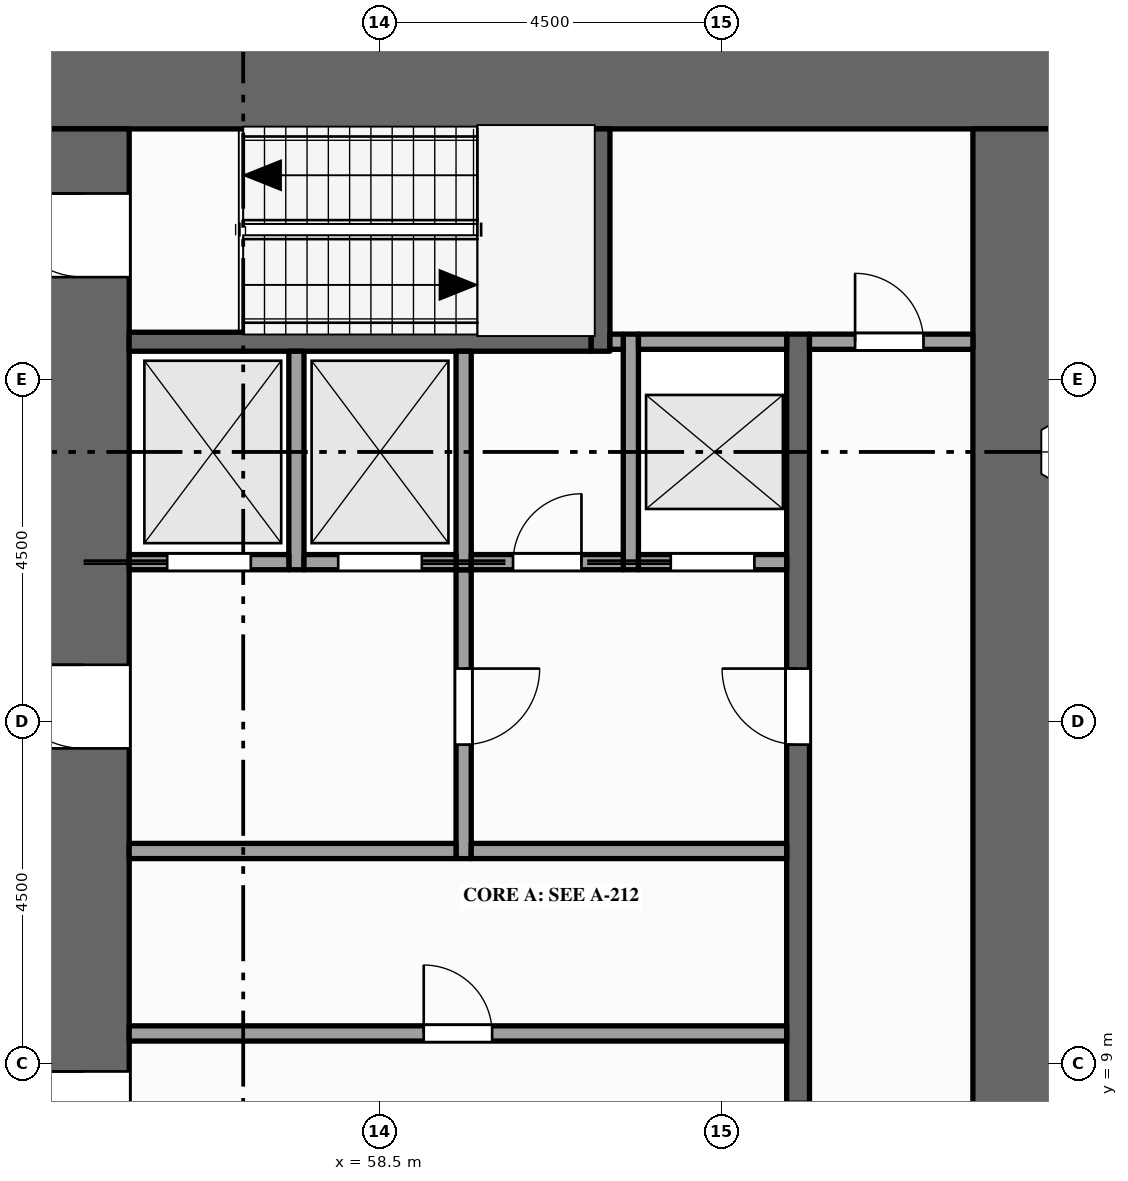
"""IFC4 building model, lengths in metres.
Left out: names, types, materials, properties, quantities, classifications, styles, units other than length and angle.
Written with IfcOpenShell. Run it as: python <this file> out.ifc"""

import sys

from ifc_helpers import new_model, si_unit, direction, frame, frame_2d, origin, place, context, subcontext, project, spatial, rectangle, extrude, element, fill, save


model = new_model("IFC4")
c1 = context("Model", 3, precision=1e-05, world=origin(), true_north=direction((0.0, 1.0)))
c2 = subcontext(c1, "Body", "Model", "MODEL_VIEW")
j1 = project(units=[si_unit("LENGTHUNIT", "METRE"), si_unit("PLANEANGLEUNIT", "RADIAN")], contexts=[c1])
p1 = place(None, origin())
s1 = spatial("IfcSite", under=j1, at=p1, CompositionType="ELEMENT")
p2 = place(p1, origin())
s2 = spatial("IfcBuilding", under=s1, at=p2, CompositionType="ELEMENT")
p3 = place(p2, frame((0.0, 0.0, 61.0)))
s3 = spatial("IfcBuildingStorey", under=s2, at=p3, CompositionType="ELEMENT", Elevation=61.0)
p4 = place(p3, frame((54.0, 21.9, -0.15), z_axis=(0.0, 0.0, 1.0), x_axis=(1.0, 0.0, 0.0)))
e1 = element("IfcWall", 1, at=p4, inside=s3, PredefinedType="SHEAR", context=c2, shape_type="SweptSolid", body=[
    extrude(rectangle(XDim=13.5, YDim=1.2, at=frame_2d((6.75, 0.0))), origin(), (0.0, 0.0, 1.0), 4.0),
])
p5 = place(p3, frame((54.6, 1.2, -0.15), z_axis=(0.0, 0.0, 1.0), x_axis=(0.0, 1.0, 0.0)))
e2 = element("IfcWall", 2, at=p5, inside=s3, PredefinedType="SHEAR", context=c2, shape_type="SweptSolid", body=[
    extrude(rectangle(XDim=20.1, YDim=1.2, at=frame_2d((10.05, 0.0))), origin(), (0.0, 0.0, 1.0), 4.0),
])
p6 = place(p5, frame((5.9, 0.0, 0.15)))
e3 = element("IfcOpeningElement", 3, at=p6, cuts=e2, PredefinedType="OPENING", context=c2, shape_type="SweptSolid", body=[
    extrude(rectangle(XDim=1.8, YDim=2.1, at=frame_2d((0.9, 1.05))), frame((0.0, 0.61, 0.0), z_axis=(0.0, -1.0, 0.0), x_axis=(1.0, 0.0, 0.0)), (0.0, 0.0, 1.0), 1.22),
])
p7 = place(p5, frame((11.95, 0.0, 0.15)))
e4 = element("IfcOpeningElement", 4, at=p7, cuts=e2, PredefinedType="OPENING", context=c2, shape_type="SweptSolid", body=[
    extrude(rectangle(XDim=1.1, YDim=2.1, at=frame_2d((0.55, 1.05))), frame((0.0, 0.61, 0.0), z_axis=(0.0, -1.0, 0.0), x_axis=(1.0, 0.0, 0.0)), (0.0, 0.0, 1.0), 1.22),
])
p8 = place(p5, frame((0.95, 0.0, 0.15)))
e5 = element("IfcOpeningElement", 5, at=p8, cuts=e2, PredefinedType="OPENING", context=c2, shape_type="SweptSolid", body=[
    extrude(rectangle(XDim=1.1, YDim=2.1, at=frame_2d((0.55, 1.05))), frame((0.0, 0.61, 0.0), z_axis=(0.0, -1.0, 0.0), x_axis=(1.0, 0.0, 0.0)), (0.0, 0.0, 1.0), 1.22),
])
p9 = place(p5, frame((18.15, 0.0, 0.15)))
e6 = element("IfcOpeningElement", 6, at=p9, cuts=e2, PredefinedType="OPENING", context=c2, shape_type="SweptSolid", body=[
    extrude(rectangle(XDim=1.1, YDim=2.1, at=frame_2d((0.55, 1.05))), frame((0.0, 0.61, 0.0), z_axis=(0.0, -1.0, 0.0), x_axis=(1.0, 0.0, 0.0)), (0.0, 0.0, 1.0), 1.22),
])
p10 = place(p3, frame((66.9, 1.2, -0.15), z_axis=(0.0, 0.0, 1.0), x_axis=(0.0, 1.0, 0.0)))
e7 = element("IfcWall", 7, at=p10, inside=s3, PredefinedType="SHEAR", context=c2, shape_type="SweptSolid", body=[
    extrude(rectangle(XDim=20.1, YDim=1.2, at=frame_2d((10.05, 0.0))), origin(), (0.0, 0.0, 1.0), 4.0),
])
p11 = place(p3, frame((57.4, 15.5, 0.0), z_axis=(0.0, 0.0, 1.0), x_axis=(0.0, 1.0, 0.0)))
e8 = element("IfcWall", 8, at=p11, inside=s3, PredefinedType="SOLIDWALL", context=c2, shape_type="SweptSolid", body=[
    extrude(rectangle(XDim=2.875, YDim=0.2, at=frame_2d((1.438, 0.0))), origin(), (0.0, 0.0, 1.0), 3.85),
])
p12 = place(p3, frame((59.6, 11.7, 0.0), z_axis=(0.0, 0.0, 1.0), x_axis=(0.0, 1.0, 0.0)))
e9 = element("IfcWall", 9, at=p12, inside=s3, PredefinedType="PARTITIONING", context=c2, shape_type="SweptSolid", body=[
    extrude(rectangle(XDim=3.8, YDim=0.2, at=frame_2d((1.9, 0.0))), origin(), (0.0, 0.0, 1.0), 3.85),
])
p13 = place(p12, frame((1.5, 0.0, 0.0)))
e10 = element("IfcOpeningElement", 10, at=p13, cuts=e9, PredefinedType="OPENING", context=c2, shape_type="SweptSolid", body=[
    extrude(rectangle(XDim=1.0, YDim=2.1, at=frame_2d((0.5, 1.05))), frame((0.0, 0.11, 0.0), z_axis=(0.0, -1.0, 0.0), x_axis=(1.0, 0.0, 0.0)), (0.0, 0.0, 1.0), 0.22),
])
p14 = place(p3, frame((59.6, 15.5, 0.0), z_axis=(0.0, 0.0, 1.0), x_axis=(0.0, 1.0, 0.0)))
e11 = element("IfcWall", 11, at=p14, inside=s3, PredefinedType="SOLIDWALL", context=c2, shape_type="SweptSolid", body=[
    extrude(rectangle(XDim=2.875, YDim=0.2, at=frame_2d((1.438, 0.0))), origin(), (0.0, 0.0, 1.0), 3.85),
])
p15 = place(p3, frame((61.4, 18.375, 0.0), z_axis=(0.0, 0.0, 1.0), x_axis=(0.0, 1.0, 0.0)))
e12 = element("IfcWall", 12, at=p15, inside=s3, PredefinedType="SHEAR", context=c2, shape_type="SweptSolid", body=[
    extrude(rectangle(XDim=2.925, YDim=0.25, at=frame_2d((1.462, 0.0))), origin(), (0.0, 0.0, 1.0), 3.85),
])
p16 = place(p3, frame((61.8, 15.5, 0.0), z_axis=(0.0, 0.0, 1.0), x_axis=(0.0, 1.0, 0.0)))
e13 = element("IfcWall", 13, at=p16, inside=s3, PredefinedType="SOLIDWALL", context=c2, shape_type="SweptSolid", body=[
    extrude(rectangle(XDim=3.1, YDim=0.2, at=frame_2d((1.55, 0.0))), origin(), (0.0, 0.0, 1.0), 3.85),
])
p17 = place(p3, frame((64.0, 4.1, 0.0), z_axis=(0.0, 0.0, 1.0), x_axis=(0.0, 1.0, 0.0)))
e14 = element("IfcWall", 14, at=p17, inside=s3, PredefinedType="SHEAR", context=c2, shape_type="SweptSolid", body=[
    extrude(rectangle(XDim=14.5, YDim=0.3, at=frame_2d((7.25, 0.0))), origin(), (0.0, 0.0, 1.0), 3.85),
])
p18 = place(p17, frame((3.4, 0.0, 0.0)))
e15 = element("IfcOpeningElement", 15, at=p18, cuts=e14, PredefinedType="OPENING", context=c2, shape_type="SweptSolid", body=[
    extrude(rectangle(XDim=1.0, YDim=2.1, at=frame_2d((0.5, 1.05))), frame((0.0, 0.16, 0.0), z_axis=(0.0, -1.0, 0.0), x_axis=(1.0, 0.0, 0.0)), (0.0, 0.0, 1.0), 0.32),
])
p19 = place(p17, frame((9.1, 0.0, 0.0)))
e16 = element("IfcOpeningElement", 16, at=p19, cuts=e14, PredefinedType="OPENING", context=c2, shape_type="SweptSolid", body=[
    extrude(rectangle(XDim=1.0, YDim=2.1, at=frame_2d((0.5, 1.05))), frame((0.0, 0.16, 0.0), z_axis=(0.0, -1.0, 0.0), x_axis=(1.0, 0.0, 0.0)), (0.0, 0.0, 1.0), 0.32),
])
p20 = place(p3, frame((55.2, 9.4, 0.0), z_axis=(0.0, 0.0, 1.0), x_axis=(1.0, 0.0, 0.0)))
e17 = element("IfcWall", 17, at=p20, inside=s3, PredefinedType="PARTITIONING", context=c2, shape_type="SweptSolid", body=[
    extrude(rectangle(XDim=8.65, YDim=0.2, at=frame_2d((4.325, 0.0))), origin(), (0.0, 0.0, 1.0), 3.85),
])
p21 = place(p20, frame((3.875, 0.0, 0.0)))
e18 = element("IfcOpeningElement", 18, at=p21, cuts=e17, PredefinedType="OPENING", context=c2, shape_type="SweptSolid", body=[
    extrude(rectangle(XDim=0.9, YDim=2.1, at=frame_2d((0.45, 1.05))), frame((0.0, 0.11, 0.0), z_axis=(0.0, -1.0, 0.0), x_axis=(1.0, 0.0, 0.0)), (0.0, 0.0, 1.0), 0.22),
])
p22 = place(p3, frame((55.2, 11.8, 0.0), z_axis=(0.0, 0.0, 1.0), x_axis=(1.0, 0.0, 0.0)))
e19 = element("IfcWall", 19, at=p22, inside=s3, PredefinedType="PARTITIONING", context=c2, shape_type="SweptSolid", body=[
    extrude(rectangle(XDim=4.3, YDim=0.2, at=frame_2d((2.15, 0.0))), origin(), (0.0, 0.0, 1.0), 3.85),
])
p23 = place(p3, frame((59.7, 11.8, 0.0), z_axis=(0.0, 0.0, 1.0), x_axis=(1.0, 0.0, 0.0)))
e20 = element("IfcWall", 20, at=p23, inside=s3, PredefinedType="PARTITIONING", context=c2, shape_type="SweptSolid", body=[
    extrude(rectangle(XDim=4.15, YDim=0.2, at=frame_2d((2.075, 0.0))), origin(), (0.0, 0.0, 1.0), 3.85),
])
p24 = place(p3, frame((55.2, 15.6, 0.0), z_axis=(0.0, 0.0, 1.0), x_axis=(1.0, 0.0, 0.0)))
e21 = element("IfcWall", 21, at=p24, inside=s3, PredefinedType="SOLIDWALL", context=c2, shape_type="SweptSolid", body=[
    extrude(rectangle(XDim=2.1, YDim=0.2, at=frame_2d((1.05, 0.0))), origin(), (0.0, 0.0, 1.0), 3.85),
])
p25 = place(p24, frame((0.5, 0.0, 0.012)))
e22 = element("IfcOpeningElement", 22, at=p25, cuts=e21, PredefinedType="OPENING", context=c2, shape_type="SweptSolid", body=[
    extrude(rectangle(XDim=1.1, YDim=2.1, at=frame_2d((0.55, 1.05))), frame((0.0, 0.11, 0.0), z_axis=(0.0, -1.0, 0.0), x_axis=(1.0, 0.0, 0.0)), (0.0, 0.0, 1.0), 0.22),
])
p26 = place(p3, frame((57.5, 15.6, 0.0), z_axis=(0.0, 0.0, 1.0), x_axis=(1.0, 0.0, 0.0)))
e23 = element("IfcWall", 23, at=p26, inside=s3, PredefinedType="SOLIDWALL", context=c2, shape_type="SweptSolid", body=[
    extrude(rectangle(XDim=2.0, YDim=0.2, at=frame_2d((1.0, 0.0))), origin(), (0.0, 0.0, 1.0), 3.85),
])
p27 = place(p26, frame((0.45, 0.0, 0.012)))
e24 = element("IfcOpeningElement", 24, at=p27, cuts=e23, PredefinedType="OPENING", context=c2, shape_type="SweptSolid", body=[
    extrude(rectangle(XDim=1.1, YDim=2.1, at=frame_2d((0.55, 1.05))), frame((0.0, 0.11, 0.0), z_axis=(0.0, -1.0, 0.0), x_axis=(1.0, 0.0, 0.0)), (0.0, 0.0, 1.0), 0.22),
])
p28 = place(p3, frame((59.7, 15.6, 0.0), z_axis=(0.0, 0.0, 1.0), x_axis=(1.0, 0.0, 0.0)))
e25 = element("IfcWall", 25, at=p28, inside=s3, PredefinedType="PARTITIONING", context=c2, shape_type="SweptSolid", body=[
    extrude(rectangle(XDim=2.0, YDim=0.2, at=frame_2d((1.0, 0.0))), origin(), (0.0, 0.0, 1.0), 3.85),
])
p29 = place(p28, frame((0.55, 0.0, 0.0)))
e26 = element("IfcOpeningElement", 26, at=p29, cuts=e25, PredefinedType="OPENING", context=c2, shape_type="SweptSolid", body=[
    extrude(rectangle(XDim=0.9, YDim=2.1, at=frame_2d((0.45, 1.05))), frame((0.0, 0.11, 0.0), z_axis=(0.0, -1.0, 0.0), x_axis=(1.0, 0.0, 0.0)), (0.0, 0.0, 1.0), 0.22),
])
p30 = place(p3, frame((61.9, 15.6, 0.0), z_axis=(0.0, 0.0, 1.0), x_axis=(1.0, 0.0, 0.0)))
e27 = element("IfcWall", 27, at=p30, inside=s3, PredefinedType="SOLIDWALL", context=c2, shape_type="SweptSolid", body=[
    extrude(rectangle(XDim=1.95, YDim=0.2, at=frame_2d((0.975, 0.0))), origin(), (0.0, 0.0, 1.0), 3.85),
])
p31 = place(p30, frame((0.425, 0.0, 0.012)))
e28 = element("IfcOpeningElement", 28, at=p31, cuts=e27, PredefinedType="OPENING", context=c2, shape_type="SweptSolid", body=[
    extrude(rectangle(XDim=1.1, YDim=2.1, at=frame_2d((0.55, 1.05))), frame((0.0, 0.11, 0.0), z_axis=(0.0, -1.0, 0.0), x_axis=(1.0, 0.0, 0.0)), (0.0, 0.0, 1.0), 0.22),
])
p32 = place(p3, frame((55.2, 18.5, 0.0), z_axis=(0.0, 0.0, 1.0), x_axis=(1.0, 0.0, 0.0)))
e29 = element("IfcWall", 29, at=p32, inside=s3, PredefinedType="SHEAR", context=c2, shape_type="SweptSolid", body=[
    extrude(rectangle(XDim=6.075, YDim=0.25, at=frame_2d((3.038, 0.0))), origin(), (0.0, 0.0, 1.0), 3.85),
])
p33 = place(p3, frame((61.525, 18.5, 0.0), z_axis=(0.0, 0.0, 1.0), x_axis=(1.0, 0.0, 0.0)))
e30 = element("IfcWall", 30, at=p33, inside=s3, PredefinedType="PARTITIONING", context=c2, shape_type="SweptSolid", body=[
    extrude(rectangle(XDim=0.175, YDim=0.2, at=frame_2d((0.087, 0.0))), origin(), (0.0, 0.0, 1.0), 3.85),
])
p34 = place(p3, frame((61.9, 18.5, 0.0), z_axis=(0.0, 0.0, 1.0), x_axis=(1.0, 0.0, 0.0)))
e31 = element("IfcWall", 31, at=p34, inside=s3, PredefinedType="SOLIDWALL", context=c2, shape_type="SweptSolid", body=[
    extrude(rectangle(XDim=1.95, YDim=0.2, at=frame_2d((0.975, 0.0))), origin(), (0.0, 0.0, 1.0), 3.85),
])
p35 = place(p3, frame((64.15, 18.5, 0.0), z_axis=(0.0, 0.0, 1.0), x_axis=(1.0, 0.0, 0.0)))
e32 = element("IfcWall", 32, at=p35, inside=s3, PredefinedType="PARTITIONING", context=c2, shape_type="SweptSolid", body=[
    extrude(rectangle(XDim=2.15, YDim=0.2, at=frame_2d((1.075, 0.0))), origin(), (0.0, 0.0, 1.0), 3.85),
])
p36 = place(p35, frame((0.6, 0.0, 0.0)))
e33 = element("IfcOpeningElement", 33, at=p36, cuts=e32, PredefinedType="OPENING", context=c2, shape_type="SweptSolid", body=[
    extrude(rectangle(XDim=0.9, YDim=2.1, at=frame_2d((0.45, 1.05))), frame((0.0, 0.11, 0.0), z_axis=(0.0, -1.0, 0.0), x_axis=(1.0, 0.0, 0.0)), (0.0, 0.0, 1.0), 0.22),
])
p37 = place(p25, origin())
e34 = element("IfcDoor", 34, at=p37, inside=s3, OperationType="SLIDING_TO_LEFT", PredefinedType="DOOR", context=c2, shape_type="SweptSolid", body=[
    extrude(rectangle(XDim=1.1, YDim=2.1, at=frame_2d((0.55, 1.05))), frame((0.0, 0.025, 0.0), z_axis=(0.0, -1.0, 0.0), x_axis=(1.0, 0.0, 0.0)), (0.0, 0.0, 1.0), 0.05),
])
fill(e22, e34)
p38 = place(p27, origin())
e35 = element("IfcDoor", 35, at=p38, inside=s3, OperationType="SLIDING_TO_RIGHT", PredefinedType="DOOR", context=c2, shape_type="SweptSolid", body=[
    extrude(rectangle(XDim=1.1, YDim=2.1, at=frame_2d((0.55, 1.05))), frame((0.0, 0.025, 0.0), z_axis=(0.0, -1.0, 0.0), x_axis=(1.0, 0.0, 0.0)), (0.0, 0.0, 1.0), 0.05),
])
fill(e24, e35)
p39 = place(p31, origin())
e36 = element("IfcDoor", 36, at=p39, inside=s3, OperationType="SLIDING_TO_LEFT", PredefinedType="DOOR", context=c2, shape_type="SweptSolid", body=[
    extrude(rectangle(XDim=1.1, YDim=2.1, at=frame_2d((0.55, 1.05))), frame((0.0, 0.025, 0.0), z_axis=(0.0, -1.0, 0.0), x_axis=(1.0, 0.0, 0.0)), (0.0, 0.0, 1.0), 0.05),
])
fill(e28, e36)
p40 = place(p6, origin())
e37 = element("IfcDoor", 37, at=p40, inside=s3, OperationType="DOUBLE_DOOR_SINGLE_SWING", PredefinedType="DOOR", context=c2, shape_type="SweptSolid", body=[
    extrude(rectangle(XDim=1.8, YDim=2.1, at=frame_2d((0.9, 1.05))), frame((0.0, 0.025, 0.0), z_axis=(0.0, -1.0, 0.0), x_axis=(1.0, 0.0, 0.0)), (0.0, 0.0, 1.0), 0.05),
])
fill(e3, e37)
p41 = place(p7, origin())
e38 = element("IfcDoor", 38, at=p41, inside=s3, OperationType="SINGLE_SWING_RIGHT", PredefinedType="DOOR", context=c2, shape_type="SweptSolid", body=[
    extrude(rectangle(XDim=1.1, YDim=2.1, at=frame_2d((0.55, 1.05))), frame((0.0, 0.025, 0.0), z_axis=(0.0, -1.0, 0.0), x_axis=(1.0, 0.0, 0.0)), (0.0, 0.0, 1.0), 0.05),
])
fill(e4, e38)
p42 = place(p13, origin())
e39 = element("IfcDoor", 39, at=p42, inside=s3, OperationType="SINGLE_SWING_RIGHT", PredefinedType="DOOR", context=c2, shape_type="SweptSolid", body=[
    extrude(rectangle(XDim=1.0, YDim=2.1, at=frame_2d((0.5, 1.05))), frame((0.0, 0.025, 0.0), z_axis=(0.0, -1.0, 0.0), x_axis=(1.0, 0.0, 0.0)), (0.0, 0.0, 1.0), 0.05),
])
fill(e10, e39)
p43 = place(p19, origin())
e40 = element("IfcDoor", 40, at=p43, inside=s3, OperationType="SINGLE_SWING_RIGHT", PredefinedType="DOOR", context=c2, shape_type="SweptSolid", body=[
    extrude(rectangle(XDim=1.0, YDim=2.1, at=frame_2d((0.5, 1.05))), frame((0.0, 0.025, 0.0), z_axis=(0.0, -1.0, 0.0), x_axis=(1.0, 0.0, 0.0)), (0.0, 0.0, 1.0), 0.05),
])
fill(e16, e40)
p44 = place(p9, origin())
e41 = element("IfcDoor", 41, at=p44, inside=s3, OperationType="SINGLE_SWING_RIGHT", PredefinedType="DOOR", context=c2, shape_type="SweptSolid", body=[
    extrude(rectangle(XDim=1.1, YDim=2.1, at=frame_2d((0.55, 1.05))), frame((0.0, 0.025, 0.0), z_axis=(0.0, -1.0, 0.0), x_axis=(1.0, 0.0, 0.0)), (0.0, 0.0, 1.0), 0.05),
])
fill(e6, e41)
p45 = place(p36, origin())
e42 = element("IfcDoor", 42, at=p45, inside=s3, OperationType="SINGLE_SWING_LEFT", PredefinedType="DOOR", context=c2, shape_type="SweptSolid", body=[
    extrude(rectangle(XDim=0.9, YDim=2.1, at=frame_2d((0.45, 1.05))), frame((0.0, 0.025, 0.0), z_axis=(0.0, -1.0, 0.0), x_axis=(1.0, 0.0, 0.0)), (0.0, 0.0, 1.0), 0.05),
])
fill(e33, e42)
p46 = place(p21, origin())
e43 = element("IfcDoor", 43, at=p46, inside=s3, OperationType="SINGLE_SWING_LEFT", PredefinedType="DOOR", context=c2, shape_type="SweptSolid", body=[
    extrude(rectangle(XDim=0.9, YDim=2.1, at=frame_2d((0.45, 1.05))), frame((0.0, 0.025, 0.0), z_axis=(0.0, -1.0, 0.0), x_axis=(1.0, 0.0, 0.0)), (0.0, 0.0, 1.0), 0.05),
])
fill(e18, e43)
p47 = place(p29, origin())
e44 = element("IfcDoor", 44, at=p47, inside=s3, OperationType="SINGLE_SWING_RIGHT", PredefinedType="DOOR", context=c2, shape_type="SweptSolid", body=[
    extrude(rectangle(XDim=0.9, YDim=2.1, at=frame_2d((0.45, 1.05))), frame((0.0, 0.025, 0.0), z_axis=(0.0, -1.0, 0.0), x_axis=(1.0, 0.0, 0.0)), (0.0, 0.0, 1.0), 0.05),
])
fill(e26, e44)
save(model, sys.argv[1])
